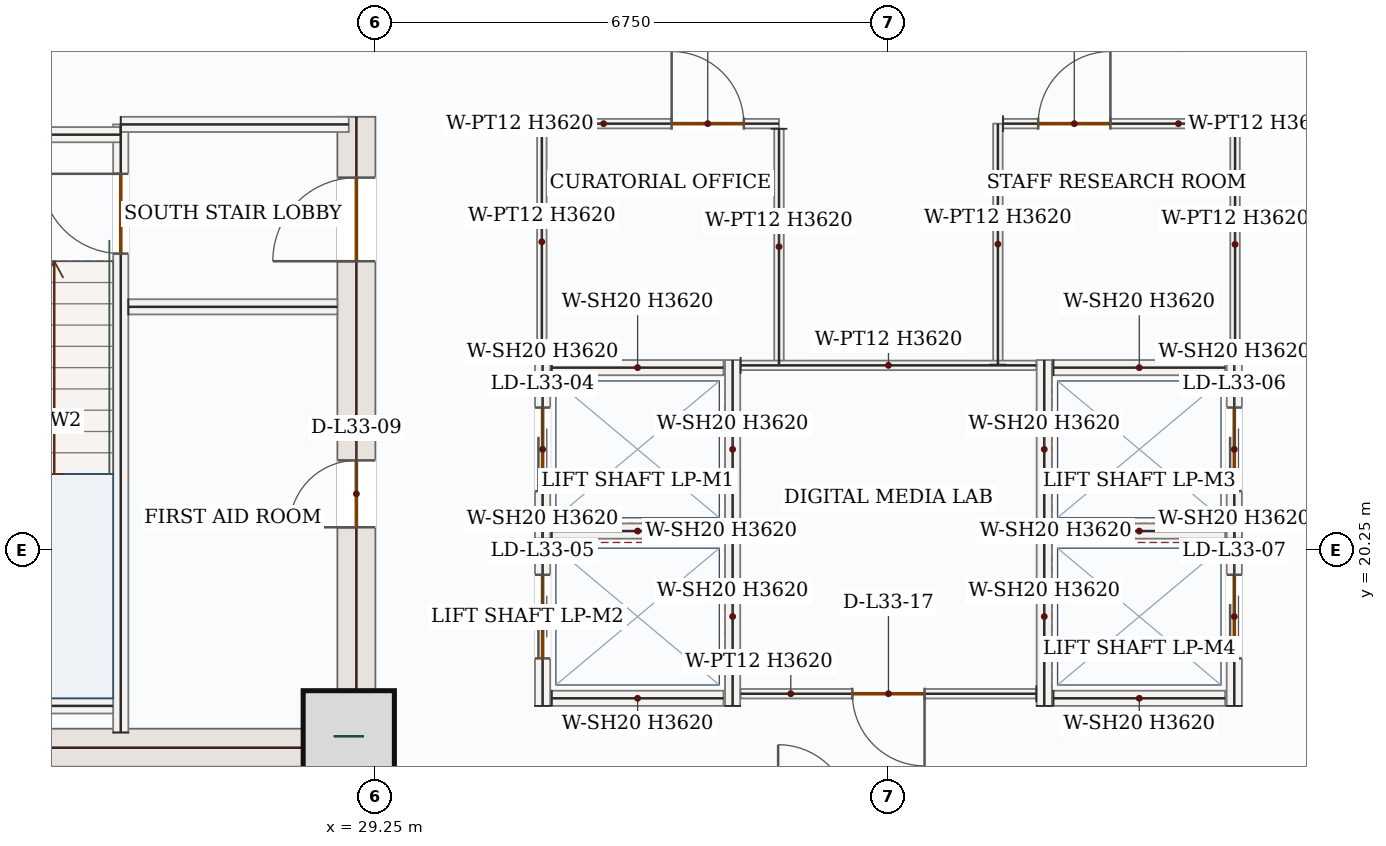
"""IFC4 building model, lengths in metres.
Left out: names, types, materials, properties, quantities, classifications, styles, units other than length and angle.
Written with IfcOpenShell. Run it as: python <this file> out.ifc"""

import sys

from ifc_helpers import new_model, si_unit, direction, frame, frame_2d, origin, origin_2d, place, context, subcontext, project, spatial, rectangle, extrude, source, transform, mapped, element, fill, save


model = new_model("IFC4")
c1 = context("Model", 3, precision=1e-05, world=origin(), true_north=direction((0.0, 1.0)))
c2 = subcontext(c1, "Body", "Model", "MODEL_VIEW")
j1 = project(units=[si_unit("LENGTHUNIT", "METRE"), si_unit("PLANEANGLEUNIT", "RADIAN")], contexts=[c1])
p1 = place(None, origin())
s1 = spatial("IfcSite", under=j1, at=p1, CompositionType="ELEMENT")
p2 = place(p1, origin())
s2 = spatial("IfcBuilding", under=s1, at=p2, CompositionType="ELEMENT")
p3 = place(p2, frame((0.0, 0.0, 147.3)))
s3 = spatial("IfcBuildingStorey", under=s2, at=p3, CompositionType="ELEMENT", Elevation=147.3)
p4 = place(p3, frame((29.0, 17.4, 0.0), z_axis=(0.0, 0.0, 1.0), x_axis=(0.0, 1.0, 0.0)))
e1 = element("IfcWall", 1, at=p4, inside=s3, PredefinedType="SHEAR", context=c2, shape_type="SweptSolid", body=[
    extrude(rectangle(XDim=8.55, YDim=0.5, at=frame_2d((4.275, 0.0))), origin(), (0.0, 0.0, 1.0), 3.62),
])
p5 = place(p4, frame((6.65, 0.0, 0.0)))
e2 = element("IfcOpeningElement", 2, at=p5, cuts=e1, PredefinedType="OPENING", context=c2, shape_type="SweptSolid", body=[
    extrude(rectangle(XDim=1.1, YDim=2.2, at=frame_2d((0.55, 1.1))), frame((0.0, 0.26, 0.0), z_axis=(0.0, -1.0, 0.0), x_axis=(1.0, 0.0, 0.0)), (0.0, 0.0, 1.0), 0.52),
])
p6 = place(p4, frame((3.15, 0.0, 0.0)))
e3 = element("IfcOpeningElement", 3, at=p6, cuts=e1, PredefinedType="OPENING", context=c2, shape_type="SweptSolid", body=[
    extrude(rectangle(XDim=0.88, YDim=2.1, at=frame_2d((0.44, 1.05))), frame((0.0, 0.26, 0.0), z_axis=(0.0, -1.0, 0.0), x_axis=(1.0, 0.0, 0.0)), (0.0, 0.0, 1.0), 0.52),
])
m1 = source(origin(), c2, "Body", "SweptSolid", [
    extrude(rectangle(XDim=7.0, YDim=0.5, at=frame_2d((3.5, 0.0))), origin(), (0.0, 0.0, 1.0), 3.62),
])
p7 = place(p3, frame((21.75, 17.65, 0.0), z_axis=(0.0, 0.0, 1.0), x_axis=(1.0, 0.0, 0.0)))
e4 = element("IfcWall", 4, at=p7, inside=s3, PredefinedType="SHEAR", context=c2, shape_type="MappedRepresentation", body=[
    mapped(m1, transform((0.0, 0.0, 0.0), x_axis=(1.0, 0.0, 0.0), y_axis=(0.0, 1.0, 0.0), z_axis=(0.0, 0.0, 1.0), scale=1.0)),
])
m2 = source(origin(), c2, "Body", "SweptSolid", [
    extrude(rectangle(XDim=1.2, YDim=1.2, at=origin_2d()), origin(), (0.0, 0.0, 1.0), 3.9),
])
p8 = place(p3, frame((28.9, 17.8, 0.0), z_axis=(0.0, 0.0, 1.0), x_axis=(1.0, 0.0, 0.0)))
e5 = element("IfcColumn", 5, at=p8, inside=s3, PredefinedType="COLUMN", context=c2, shape_type="MappedRepresentation", body=[
    mapped(m2, transform((0.0, 0.0, 0.0), x_axis=(1.0, 0.0, 0.0), y_axis=(0.0, 1.0, 0.0), z_axis=(0.0, 0.0, 1.0), scale=1.0)),
])
p9 = place(p3, frame((25.9, 17.85, 0.0), z_axis=(0.0, 0.0, 1.0), x_axis=(0.0, 1.0, 0.0)))
e6 = element("IfcWall", 6, at=p9, inside=s3, PredefinedType="SOLIDWALL", context=c2, shape_type="SweptSolid", body=[
    extrude(rectangle(XDim=8.0, YDim=0.2, at=frame_2d((4.0, 0.0))), origin(), (0.0, 0.0, 1.0), 3.62),
])
p10 = place(p9, frame((6.3, 0.0, 0.0)))
e7 = element("IfcOpeningElement", 7, at=p10, cuts=e6, PredefinedType="OPENING", context=c2, shape_type="SweptSolid", body=[
    extrude(rectangle(XDim=1.05, YDim=2.15, at=frame_2d((0.525, 1.075))), frame((0.0, 0.11, 0.0), z_axis=(0.0, -1.0, 0.0), x_axis=(1.0, 0.0, 0.0)), (0.0, 0.0, 1.0), 0.22),
])
m3 = source(origin(), c2, "Body", "SweptSolid", [
    extrude(rectangle(XDim=4.25, YDim=0.2, at=frame_2d((2.125, 0.0))), origin(), (0.0, 0.0, 1.0), 3.62),
])
p11 = place(p3, frame((21.65, 25.715, 0.0), z_axis=(0.0, 0.0, 1.0), x_axis=(1.0, 0.0, 0.0)))
e8 = element("IfcWall", 8, at=p11, inside=s3, PredefinedType="SOLIDWALL", context=c2, shape_type="MappedRepresentation", body=[
    mapped(m3, transform((0.0, 0.0, 0.0), x_axis=(1.0, 0.0, 0.0), y_axis=(0.0, 1.0, 0.0), z_axis=(0.0, 0.0, 1.0), scale=1.0)),
])
m4 = source(origin(), c2, "Body", "SweptSolid", [
    extrude(rectangle(XDim=3.0, YDim=0.2, at=frame_2d((1.5, 0.0))), origin(), (0.0, 0.0, 1.0), 3.62),
])
p12 = place(p3, frame((25.9, 25.85, 0.0), z_axis=(0.0, 0.0, 1.0), x_axis=(1.0, 0.0, 0.0)))
e9 = element("IfcWall", 9, at=p12, inside=s3, PredefinedType="SOLIDWALL", context=c2, shape_type="MappedRepresentation", body=[
    mapped(m4, transform((0.0, 0.0, 0.0), x_axis=(1.0, 0.0, 0.0), y_axis=(0.0, 1.0, 0.0), z_axis=(0.0, 0.0, 1.0), scale=1.0)),
])
m5 = source(origin(), c2, "Body", "SweptSolid", [
    extrude(rectangle(XDim=3.25, YDim=0.2, at=frame_2d((1.625, 0.0))), origin(), (0.0, 0.0, 1.0), 3.62),
])
p13 = place(p3, frame((22.55, 18.2, 0.0), z_axis=(0.0, 0.0, 1.0), x_axis=(1.0, 0.0, 0.0)))
e10 = element("IfcWall", 10, at=p13, inside=s3, PredefinedType="SOLIDWALL", context=c2, shape_type="MappedRepresentation", body=[
    mapped(m5, transform((0.0, 0.0, 0.0), x_axis=(1.0, 0.0, 0.0), y_axis=(0.0, 1.0, 0.0), z_axis=(0.0, 0.0, 1.0), scale=1.0)),
])
m6 = source(origin(), c2, "Body", "SweptSolid", [
    extrude(rectangle(XDim=2.75, YDim=0.2, at=frame_2d((1.375, 0.0))), origin(), (0.0, 0.0, 1.0), 3.62),
])
p14 = place(p3, frame((26.0, 23.45, 0.0), z_axis=(0.0, 0.0, 1.0), x_axis=(1.0, 0.0, 0.0)))
e11 = element("IfcWall", 11, at=p14, inside=s3, PredefinedType="SOLIDWALL", context=c2, shape_type="MappedRepresentation", body=[
    mapped(m6, transform((0.0, 0.0, 0.0), x_axis=(1.0, 0.0, 0.0), y_axis=(0.0, 1.0, 0.0), z_axis=(0.0, 0.0, 1.0), scale=1.0)),
])
p15 = place(p3, frame((31.45, 20.4, 0.0), z_axis=(0.0, 0.0, 1.0), x_axis=(0.0, 1.0, 0.0)))
e12 = element("IfcWall", 12, at=p15, inside=s3, PredefinedType="SOLIDWALL", context=c2, shape_type="SweptSolid", body=[
    extrude(rectangle(XDim=2.35, YDim=0.2, at=frame_2d((1.175, 0.0))), origin(), (0.0, 0.0, 1.0), 3.62),
])
p16 = place(p15, frame((0.625, 0.0, 0.0)))
e13 = element("IfcOpeningElement", 13, at=p16, cuts=e12, PredefinedType="OPENING", context=c2, shape_type="SweptSolid", body=[
    extrude(rectangle(XDim=1.1, YDim=2.15, at=frame_2d((0.55, 1.075))), frame((0.0, 0.11, 0.0), z_axis=(0.0, -1.0, 0.0), x_axis=(1.0, 0.0, 0.0)), (0.0, 0.0, 1.0), 0.22),
])
m7 = source(origin(), c2, "Body", "SweptSolid", [
    extrude(rectangle(XDim=2.35, YDim=0.2, at=frame_2d((1.175, 0.0))), origin(), (0.0, 0.0, 1.0), 3.62),
])
p17 = place(p3, frame((33.95, 20.4, 0.0), z_axis=(0.0, 0.0, 1.0), x_axis=(0.0, 1.0, 0.0)))
e14 = element("IfcWall", 14, at=p17, inside=s3, PredefinedType="SOLIDWALL", context=c2, shape_type="MappedRepresentation", body=[
    mapped(m7, transform((0.0, 0.0, 0.0), x_axis=(1.0, 0.0, 0.0), y_axis=(0.0, 1.0, 0.0), z_axis=(0.0, 0.0, 1.0), scale=1.0)),
])
m8 = source(origin(), c2, "Body", "SweptSolid", [
    extrude(rectangle(XDim=2.26, YDim=0.2, at=frame_2d((1.13, 0.0))), origin(), (0.0, 0.0, 1.0), 3.62),
])
for number, where, z_axis, x_axis in (
    (15, (31.57, 20.5, 0.0), (0.0, 0.0, 1.0), (1.0, 0.0, 0.0)),
    (16, (31.57, 22.65, 0.0), (0.0, 0.0, 1.0), (1.0, 0.0, 0.0)),
):
    element("IfcWall", number, at=place(p3, frame(where, z_axis=z_axis, x_axis=x_axis)), inside=s3, PredefinedType="SOLIDWALL", context=c2, shape_type="MappedRepresentation", body=[
        mapped(m8, transform((0.0, 0.0, 0.0), x_axis=(1.0, 0.0, 0.0), y_axis=(0.0, 1.0, 0.0), z_axis=(0.0, 0.0, 1.0), scale=1.0)),
    ])
p18 = place(p3, frame((31.45, 18.2, 0.0), z_axis=(0.0, 0.0, 1.0), x_axis=(0.0, 1.0, 0.0)))
e17 = element("IfcWall", 17, at=p18, inside=s3, PredefinedType="SOLIDWALL", context=c2, shape_type="SweptSolid", body=[
    extrude(rectangle(XDim=2.35, YDim=0.2, at=frame_2d((1.175, 0.0))), origin(), (0.0, 0.0, 1.0), 3.62),
])
p19 = place(p18, frame((0.625, 0.0, 0.0)))
e18 = element("IfcOpeningElement", 18, at=p19, cuts=e17, PredefinedType="OPENING", context=c2, shape_type="SweptSolid", body=[
    extrude(rectangle(XDim=1.1, YDim=2.15, at=frame_2d((0.55, 1.075))), frame((0.0, 0.11, 0.0), z_axis=(0.0, -1.0, 0.0), x_axis=(1.0, 0.0, 0.0)), (0.0, 0.0, 1.0), 0.22),
])
p20 = place(p3, frame((33.95, 18.2, 0.0), z_axis=(0.0, 0.0, 1.0), x_axis=(0.0, 1.0, 0.0)))
e19 = element("IfcWall", 19, at=p20, inside=s3, PredefinedType="SOLIDWALL", context=c2, shape_type="MappedRepresentation", body=[
    mapped(m7, transform((0.0, 0.0, 0.0), x_axis=(1.0, 0.0, 0.0), y_axis=(0.0, 1.0, 0.0), z_axis=(0.0, 0.0, 1.0), scale=1.0)),
])
p21 = place(p3, frame((31.57, 18.3, 0.0), z_axis=(0.0, 0.0, 1.0), x_axis=(1.0, 0.0, 0.0)))
e20 = element("IfcWall", 20, at=p21, inside=s3, PredefinedType="SOLIDWALL", context=c2, shape_type="MappedRepresentation", body=[
    mapped(m8, transform((0.0, 0.0, 0.0), x_axis=(1.0, 0.0, 0.0), y_axis=(0.0, 1.0, 0.0), z_axis=(0.0, 0.0, 1.0), scale=1.0)),
])
p22 = place(p3, frame((38.05, 20.4, 0.0), z_axis=(0.0, 0.0, 1.0), x_axis=(0.0, 1.0, 0.0)))
e21 = element("IfcWall", 21, at=p22, inside=s3, PredefinedType="SOLIDWALL", context=c2, shape_type="MappedRepresentation", body=[
    mapped(m7, transform((0.0, 0.0, 0.0), x_axis=(1.0, 0.0, 0.0), y_axis=(0.0, 1.0, 0.0), z_axis=(0.0, 0.0, 1.0), scale=1.0)),
])
p23 = place(p3, frame((40.55, 20.4, 0.0), z_axis=(0.0, 0.0, 1.0), x_axis=(0.0, 1.0, 0.0)))
e22 = element("IfcWall", 22, at=p23, inside=s3, PredefinedType="SOLIDWALL", context=c2, shape_type="SweptSolid", body=[
    extrude(rectangle(XDim=2.35, YDim=0.2, at=frame_2d((1.175, 0.0))), origin(), (0.0, 0.0, 1.0), 3.62),
])
p24 = place(p23, frame((0.625, 0.0, 0.0)))
e23 = element("IfcOpeningElement", 23, at=p24, cuts=e22, PredefinedType="OPENING", context=c2, shape_type="SweptSolid", body=[
    extrude(rectangle(XDim=1.1, YDim=2.15, at=frame_2d((0.55, 1.075))), frame((0.0, 0.11, 0.0), z_axis=(0.0, -1.0, 0.0), x_axis=(1.0, 0.0, 0.0)), (0.0, 0.0, 1.0), 0.22),
])
for number, where, z_axis, x_axis in (
    (24, (38.17, 20.5, 0.0), (0.0, 0.0, 1.0), (1.0, 0.0, 0.0)),
    (25, (38.17, 22.65, 0.0), (0.0, 0.0, 1.0), (1.0, 0.0, 0.0)),
):
    element("IfcWall", number, at=place(p3, frame(where, z_axis=z_axis, x_axis=x_axis)), inside=s3, PredefinedType="SOLIDWALL", context=c2, shape_type="MappedRepresentation", body=[
        mapped(m8, transform((0.0, 0.0, 0.0), x_axis=(1.0, 0.0, 0.0), y_axis=(0.0, 1.0, 0.0), z_axis=(0.0, 0.0, 1.0), scale=1.0)),
    ])
p25 = place(p3, frame((38.05, 18.2, 0.0), z_axis=(0.0, 0.0, 1.0), x_axis=(0.0, 1.0, 0.0)))
e26 = element("IfcWall", 26, at=p25, inside=s3, PredefinedType="SOLIDWALL", context=c2, shape_type="MappedRepresentation", body=[
    mapped(m7, transform((0.0, 0.0, 0.0), x_axis=(1.0, 0.0, 0.0), y_axis=(0.0, 1.0, 0.0), z_axis=(0.0, 0.0, 1.0), scale=1.0)),
])
p26 = place(p3, frame((40.55, 18.2, 0.0), z_axis=(0.0, 0.0, 1.0), x_axis=(0.0, 1.0, 0.0)))
e27 = element("IfcWall", 27, at=p26, inside=s3, PredefinedType="SOLIDWALL", context=c2, shape_type="SweptSolid", body=[
    extrude(rectangle(XDim=2.35, YDim=0.2, at=frame_2d((1.175, 0.0))), origin(), (0.0, 0.0, 1.0), 3.62),
])
p27 = place(p26, frame((0.625, 0.0, 0.0)))
e28 = element("IfcOpeningElement", 28, at=p27, cuts=e27, PredefinedType="OPENING", context=c2, shape_type="SweptSolid", body=[
    extrude(rectangle(XDim=1.1, YDim=2.15, at=frame_2d((0.55, 1.075))), frame((0.0, 0.11, 0.0), z_axis=(0.0, -1.0, 0.0), x_axis=(1.0, 0.0, 0.0)), (0.0, 0.0, 1.0), 0.22),
])
p28 = place(p3, frame((38.17, 18.3, 0.0), z_axis=(0.0, 0.0, 1.0), x_axis=(1.0, 0.0, 0.0)))
e29 = element("IfcWall", 29, at=p28, inside=s3, PredefinedType="SOLIDWALL", context=c2, shape_type="MappedRepresentation", body=[
    mapped(m8, transform((0.0, 0.0, 0.0), x_axis=(1.0, 0.0, 0.0), y_axis=(0.0, 1.0, 0.0), z_axis=(0.0, 0.0, 1.0), scale=1.0)),
])
m9 = source(origin(), c2, "Body", "SweptSolid", [
    extrude(rectangle(XDim=3.11, YDim=0.125, at=frame_2d((1.555, 0.0))), origin(), (0.0, 0.0, 1.0), 3.62),
])
p29 = place(p3, frame((31.44, 22.75, 0.0), z_axis=(0.0, 0.0, 1.0), x_axis=(0.0, 1.0, 0.0)))
e30 = element("IfcWall", 30, at=p29, inside=s3, PredefinedType="PARTITIONING", context=c2, shape_type="MappedRepresentation", body=[
    mapped(m9, transform((0.0, 0.0, 0.0), x_axis=(1.0, 0.0, 0.0), y_axis=(0.0, 1.0, 0.0), z_axis=(0.0, 0.0, 1.0), scale=1.0)),
])
p30 = place(p3, frame((31.508, 25.86, 0.0), z_axis=(0.0, 0.0, 1.0), x_axis=(1.0, 0.0, 0.0)))
e31 = element("IfcWall", 31, at=p30, inside=s3, PredefinedType="PARTITIONING", context=c2, shape_type="SweptSolid", body=[
    extrude(rectangle(XDim=3.052, YDim=0.125, at=frame_2d((1.526, 0.0))), origin(), (0.0, 0.0, 1.0), 3.62),
])
p31 = place(p30, frame((1.64, 0.0, 0.0)))
e32 = element("IfcOpeningElement", 32, at=p31, cuts=e31, PredefinedType="OPENING", context=c2, shape_type="SweptSolid", body=[
    extrude(rectangle(XDim=0.95, YDim=2.15, at=frame_2d((0.475, 1.075))), frame((0.0, 0.073, 0.0), z_axis=(0.0, -1.0, 0.0), x_axis=(1.0, 0.0, 0.0)), (0.0, 0.0, 1.0), 0.145),
])
m10 = source(origin(), c2, "Body", "SweptSolid", [
    extrude(rectangle(XDim=3.103, YDim=0.125, at=frame_2d((1.551, 0.0))), origin(), (0.0, 0.0, 1.0), 3.62),
])
p32 = place(p3, frame((34.56, 25.792, 0.0), z_axis=(0.0, 0.0, 1.0), x_axis=(0.0, -1.0, 0.0)))
e33 = element("IfcWall", 33, at=p32, inside=s3, PredefinedType="PARTITIONING", context=c2, shape_type="MappedRepresentation", body=[
    mapped(m10, transform((0.0, 0.0, 0.0), x_axis=(1.0, 0.0, 0.0), y_axis=(0.0, 1.0, 0.0), z_axis=(0.0, 0.0, 1.0), scale=1.0)),
])
m11 = source(origin(), c2, "Body", "SweptSolid", [
    extrude(rectangle(XDim=3.17, YDim=0.125, at=frame_2d((1.585, 0.0))), origin(), (0.0, 0.0, 1.0), 3.62),
])
p33 = place(p3, frame((37.44, 22.69, 0.0), z_axis=(0.0, 0.0, 1.0), x_axis=(0.0, 1.0, 0.0)))
e34 = element("IfcWall", 34, at=p33, inside=s3, PredefinedType="PARTITIONING", context=c2, shape_type="MappedRepresentation", body=[
    mapped(m11, transform((0.0, 0.0, 0.0), x_axis=(1.0, 0.0, 0.0), y_axis=(0.0, 1.0, 0.0), z_axis=(0.0, 0.0, 1.0), scale=1.0)),
])
p34 = place(p3, frame((37.508, 25.86, 0.0), z_axis=(0.0, 0.0, 1.0), x_axis=(1.0, 0.0, 0.0)))
e35 = element("IfcWall", 35, at=p34, inside=s3, PredefinedType="PARTITIONING", context=c2, shape_type="SweptSolid", body=[
    extrude(rectangle(XDim=3.052, YDim=0.125, at=frame_2d((1.526, 0.0))), origin(), (0.0, 0.0, 1.0), 3.62),
])
p35 = place(p34, frame((0.463, 0.0, 0.0)))
e36 = element("IfcOpeningElement", 36, at=p35, cuts=e35, PredefinedType="OPENING", context=c2, shape_type="SweptSolid", body=[
    extrude(rectangle(XDim=0.95, YDim=2.15, at=frame_2d((0.475, 1.075))), frame((0.0, 0.073, 0.0), z_axis=(0.0, -1.0, 0.0), x_axis=(1.0, 0.0, 0.0)), (0.0, 0.0, 1.0), 0.145),
])
m12 = source(origin(), c2, "Body", "SweptSolid", [
    extrude(rectangle(XDim=3.042, YDim=0.125, at=frame_2d((1.521, 0.0))), origin(), (0.0, 0.0, 1.0), 3.62),
])
p36 = place(p3, frame((40.56, 25.792, 0.0), z_axis=(0.0, 0.0, 1.0), x_axis=(0.0, -1.0, 0.0)))
e37 = element("IfcWall", 37, at=p36, inside=s3, PredefinedType="PARTITIONING", context=c2, shape_type="MappedRepresentation", body=[
    mapped(m12, transform((0.0, 0.0, 0.0), x_axis=(1.0, 0.0, 0.0), y_axis=(0.0, 1.0, 0.0), z_axis=(0.0, 0.0, 1.0), scale=1.0)),
])
m13 = source(origin(), c2, "Body", "SweptSolid", [
    extrude(rectangle(XDim=3.89, YDim=0.125, at=frame_2d((1.945, 0.0))), origin(), (0.0, 0.0, 1.0), 3.62),
])
p37 = place(p3, frame((34.055, 22.68, 0.0), z_axis=(0.0, 0.0, 1.0), x_axis=(1.0, 0.0, 0.0)))
e38 = element("IfcWall", 38, at=p37, inside=s3, PredefinedType="PARTITIONING", context=c2, shape_type="MappedRepresentation", body=[
    mapped(m13, transform((0.0, 0.0, 0.0), x_axis=(1.0, 0.0, 0.0), y_axis=(0.0, 1.0, 0.0), z_axis=(0.0, 0.0, 1.0), scale=1.0)),
])
p38 = place(p3, frame((37.945, 18.36, 0.0), z_axis=(0.0, 0.0, 1.0), x_axis=(-1.0, 0.0, 0.0)))
e39 = element("IfcWall", 39, at=p38, inside=s3, PredefinedType="PARTITIONING", context=c2, shape_type="SweptSolid", body=[
    extrude(rectangle(XDim=3.89, YDim=0.125, at=frame_2d((1.945, 0.0))), origin(), (0.0, 0.0, 1.0), 3.62),
])
p39 = place(p38, frame((1.47, 0.0, 0.0)))
e40 = element("IfcOpeningElement", 40, at=p39, cuts=e39, PredefinedType="OPENING", context=c2, shape_type="SweptSolid", body=[
    extrude(rectangle(XDim=0.95, YDim=2.15, at=frame_2d((0.475, 1.075))), frame((0.0, 0.073, 0.0), z_axis=(0.0, -1.0, 0.0), x_axis=(1.0, 0.0, 0.0)), (0.0, 0.0, 1.0), 0.145),
])
m14 = source(origin(), c2, "Body", "SweptSolid", [
    extrude(rectangle(XDim=1.05, YDim=2.15, at=frame_2d((0.525, 1.075))), frame((0.0, 0.025, 0.0), z_axis=(0.0, -1.0, 0.0), x_axis=(1.0, 0.0, 0.0)), (0.0, 0.0, 1.0), 0.05),
])
p40 = place(p10, origin())
e41 = element("IfcDoor", 41, at=p40, inside=s3, OperationType="SINGLE_SWING_RIGHT", PredefinedType="DOOR", context=c2, shape_type="MappedRepresentation", body=[
    mapped(m14, transform((0.0, 0.0, 0.0), x_axis=(1.0, 0.0, 0.0), y_axis=(0.0, 1.0, 0.0), z_axis=(0.0, 0.0, 1.0), scale=1.0)),
])
fill(e7, e41)
m15 = source(origin(), c2, "Body", "SweptSolid", [
    extrude(rectangle(XDim=1.1, YDim=2.2, at=frame_2d((0.55, 1.1))), frame((0.0, 0.025, 0.0), z_axis=(0.0, -1.0, 0.0), x_axis=(1.0, 0.0, 0.0)), (0.0, 0.0, 1.0), 0.05),
])
p41 = place(p5, origin())
e42 = element("IfcDoor", 42, at=p41, inside=s3, OperationType="SINGLE_SWING_LEFT", PredefinedType="DOOR", context=c2, shape_type="MappedRepresentation", body=[
    mapped(m15, transform((0.0, 0.0, 0.0), x_axis=(1.0, 0.0, 0.0), y_axis=(0.0, 1.0, 0.0), z_axis=(0.0, 0.0, 1.0), scale=1.0)),
])
fill(e2, e42)
m16 = source(origin(), c2, "Body", "SweptSolid", [
    extrude(rectangle(XDim=0.88, YDim=2.1, at=frame_2d((0.44, 1.05))), frame((0.0, 0.025, 0.0), z_axis=(0.0, -1.0, 0.0), x_axis=(1.0, 0.0, 0.0)), (0.0, 0.0, 1.0), 0.05),
])
p42 = place(p6, origin())
e43 = element("IfcDoor", 43, at=p42, inside=s3, OperationType="SINGLE_SWING_LEFT", PredefinedType="DOOR", context=c2, shape_type="MappedRepresentation", body=[
    mapped(m16, transform((0.0, 0.0, 0.0), x_axis=(1.0, 0.0, 0.0), y_axis=(0.0, 1.0, 0.0), z_axis=(0.0, 0.0, 1.0), scale=1.0)),
])
fill(e3, e43)
m17 = source(origin(), c2, "Body", "SweptSolid", [
    extrude(rectangle(XDim=1.1, YDim=2.15, at=frame_2d((0.55, 1.075))), frame((0.0, 0.025, 0.0), z_axis=(0.0, -1.0, 0.0), x_axis=(1.0, 0.0, 0.0)), (0.0, 0.0, 1.0), 0.05),
])
p43 = place(p16, origin())
e44 = element("IfcDoor", 44, at=p43, inside=s3, OperationType="DOUBLE_DOOR_SLIDING", PredefinedType="DOOR", context=c2, shape_type="MappedRepresentation", body=[
    mapped(m17, transform((0.0, 0.0, 0.0), x_axis=(1.0, 0.0, 0.0), y_axis=(0.0, 1.0, 0.0), z_axis=(0.0, 0.0, 1.0), scale=1.0)),
])
fill(e13, e44)
p44 = place(p19, origin())
e45 = element("IfcDoor", 45, at=p44, inside=s3, OperationType="DOUBLE_DOOR_SLIDING", PredefinedType="DOOR", context=c2, shape_type="MappedRepresentation", body=[
    mapped(m17, transform((0.0, 0.0, 0.0), x_axis=(1.0, 0.0, 0.0), y_axis=(0.0, 1.0, 0.0), z_axis=(0.0, 0.0, 1.0), scale=1.0)),
])
fill(e18, e45)
p45 = place(p24, origin())
e46 = element("IfcDoor", 46, at=p45, inside=s3, OperationType="DOUBLE_DOOR_SLIDING", PredefinedType="DOOR", context=c2, shape_type="MappedRepresentation", body=[
    mapped(m17, transform((0.0, 0.0, 0.0), x_axis=(1.0, 0.0, 0.0), y_axis=(0.0, 1.0, 0.0), z_axis=(0.0, 0.0, 1.0), scale=1.0)),
])
fill(e23, e46)
p46 = place(p27, origin())
e47 = element("IfcDoor", 47, at=p46, inside=s3, OperationType="DOUBLE_DOOR_SLIDING", PredefinedType="DOOR", context=c2, shape_type="MappedRepresentation", body=[
    mapped(m17, transform((0.0, 0.0, 0.0), x_axis=(1.0, 0.0, 0.0), y_axis=(0.0, 1.0, 0.0), z_axis=(0.0, 0.0, 1.0), scale=1.0)),
])
fill(e28, e47)
m18 = source(origin(), c2, "Body", "SweptSolid", [
    extrude(rectangle(XDim=0.95, YDim=2.15, at=frame_2d((0.475, 1.075))), frame((0.0, 0.025, 0.0), z_axis=(0.0, -1.0, 0.0), x_axis=(1.0, 0.0, 0.0)), (0.0, 0.0, 1.0), 0.05),
])
p47 = place(p31, origin())
e48 = element("IfcDoor", 48, at=p47, inside=s3, OperationType="SINGLE_SWING_LEFT", PredefinedType="DOOR", context=c2, shape_type="MappedRepresentation", body=[
    mapped(m18, transform((0.0, 0.0, 0.0), x_axis=(1.0, 0.0, 0.0), y_axis=(0.0, 1.0, 0.0), z_axis=(0.0, 0.0, 1.0), scale=1.0)),
])
fill(e32, e48)
p48 = place(p35, origin())
e49 = element("IfcDoor", 49, at=p48, inside=s3, OperationType="SINGLE_SWING_RIGHT", PredefinedType="DOOR", context=c2, shape_type="MappedRepresentation", body=[
    mapped(m18, transform((0.0, 0.0, 0.0), x_axis=(1.0, 0.0, 0.0), y_axis=(0.0, 1.0, 0.0), z_axis=(0.0, 0.0, 1.0), scale=1.0)),
])
fill(e36, e49)
p49 = place(p39, origin())
e50 = element("IfcDoor", 50, at=p49, inside=s3, OperationType="SINGLE_SWING_LEFT", PredefinedType="DOOR", context=c2, shape_type="MappedRepresentation", body=[
    mapped(m18, transform((0.0, 0.0, 0.0), x_axis=(1.0, 0.0, 0.0), y_axis=(0.0, 1.0, 0.0), z_axis=(0.0, 0.0, 1.0), scale=1.0)),
])
fill(e40, e50)
save(model, sys.argv[1])
